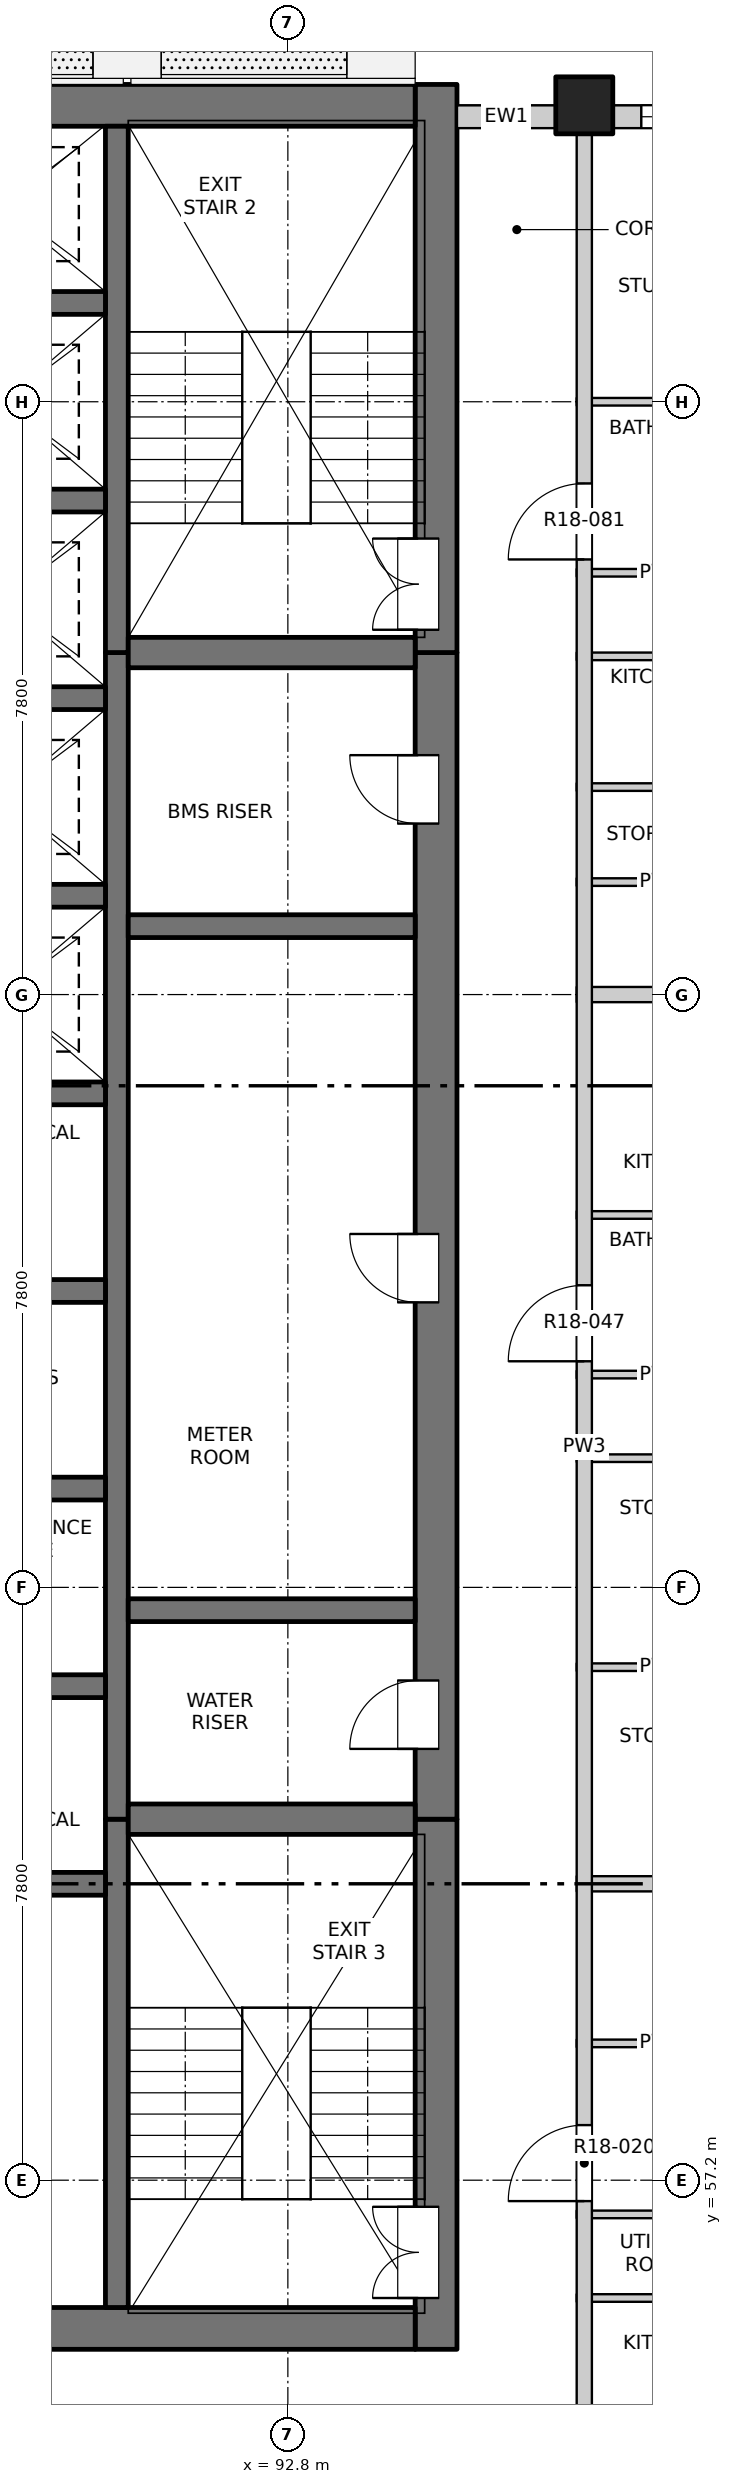
"""IFC4 building model, lengths in metres.
Left out: names, types, materials, properties, quantities, classifications, styles, units other than length and angle.
Written with IfcOpenShell. Run it as: python <this file> out.ifc"""

import sys

from ifc_helpers import new_model, si_unit, direction, frame, frame_2d, origin, origin_2d, place, context, subcontext, project, spatial, rectangle, extrude, element, fill, save


model = new_model("IFC4")
c1 = context("Model", 3, precision=1e-05, world=origin(), true_north=direction((0.0, 1.0)))
c2 = subcontext(c1, "Body", "Model", "MODEL_VIEW")
j1 = project(units=[si_unit("LENGTHUNIT", "METRE"), si_unit("PLANEANGLEUNIT", "RADIAN")], contexts=[c1])
p1 = place(None, origin())
s1 = spatial("IfcSite", under=j1, at=p1, CompositionType="ELEMENT")
p2 = place(p1, origin())
s2 = spatial("IfcBuilding", under=s1, at=p2, CompositionType="ELEMENT")
p3 = place(p2, frame((0.0, 0.0, 189.4)))
s3 = spatial("IfcBuildingStorey", under=s2, at=p3, CompositionType="ELEMENT", Elevation=189.4)
p4 = place(p3, frame((96.7, 84.5, -0.25), z_axis=(0.0, 0.0, 1.0), x_axis=(1.0, 0.0, 0.0)))
e1 = element("IfcColumn", 1, at=p4, inside=s3, PredefinedType="COLUMN", context=c2, shape_type="SweptSolid", body=[
    extrude(rectangle(XDim=0.75, YDim=0.75, at=origin_2d()), origin(), (0.0, 0.0, 1.0), 3.35),
])
p5 = place(p3, frame((94.75, 54.975, -0.25), z_axis=(0.0, 0.0, 1.0), x_axis=(0.0, 1.0, 0.0)))
e2 = element("IfcWall", 2, at=p5, inside=s3, PredefinedType="SOLIDWALL", context=c2, shape_type="SweptSolid", body=[
    extrude(rectangle(XDim=6.975, YDim=0.55, at=frame_2d((3.487, 0.0))), origin(), (0.0, 0.0, 1.0), 3.35),
])
p6 = place(p5, frame((0.675, 0.0, 0.25)))
e3 = element("IfcOpeningElement", 3, at=p6, cuts=e2, PredefinedType="OPENING", context=c2, shape_type="SweptSolid", body=[
    extrude(rectangle(XDim=1.2, YDim=2.1, at=frame_2d((0.6, 1.05))), frame((0.0, 0.285, 0.0), z_axis=(0.0, -1.0, 0.0), x_axis=(1.0, 0.0, 0.0)), (0.0, 0.0, 1.0), 0.57),
])
p7 = place(p3, frame((94.75, 61.95, -0.25), z_axis=(0.0, 0.0, 1.0), x_axis=(0.0, 1.0, 0.0)))
e4 = element("IfcWall", 4, at=p7, inside=s3, PredefinedType="SOLIDWALL", context=c2, shape_type="SweptSolid", body=[
    extrude(rectangle(XDim=15.35, YDim=0.55, at=frame_2d((7.675, 0.0))), origin(), (0.0, 0.0, 1.0), 3.35),
])
p8 = place(p7, frame((0.925, 0.0, 0.25)))
e5 = element("IfcOpeningElement", 5, at=p8, cuts=e4, PredefinedType="OPENING", context=c2, shape_type="SweptSolid", body=[
    extrude(rectangle(XDim=0.9, YDim=2.1, at=frame_2d((0.45, 1.05))), frame((0.0, 0.285, 0.0), z_axis=(0.0, -1.0, 0.0), x_axis=(1.0, 0.0, 0.0)), (0.0, 0.0, 1.0), 0.57),
])
p9 = place(p7, frame((6.8, 0.0, 0.25)))
e6 = element("IfcOpeningElement", 6, at=p9, cuts=e4, PredefinedType="OPENING", context=c2, shape_type="SweptSolid", body=[
    extrude(rectangle(XDim=0.9, YDim=2.1, at=frame_2d((0.45, 1.05))), frame((0.0, 0.285, 0.0), z_axis=(0.0, -1.0, 0.0), x_axis=(1.0, 0.0, 0.0)), (0.0, 0.0, 1.0), 0.57),
])
p10 = place(p7, frame((13.1, 0.0, 0.25)))
e7 = element("IfcOpeningElement", 7, at=p10, cuts=e4, PredefinedType="OPENING", context=c2, shape_type="SweptSolid", body=[
    extrude(rectangle(XDim=0.9, YDim=2.1, at=frame_2d((0.45, 1.05))), frame((0.0, 0.285, 0.0), z_axis=(0.0, -1.0, 0.0), x_axis=(1.0, 0.0, 0.0)), (0.0, 0.0, 1.0), 0.57),
])
p11 = place(p3, frame((94.75, 77.3, -0.25), z_axis=(0.0, 0.0, 1.0), x_axis=(0.0, 1.0, 0.0)))
e8 = element("IfcWall", 8, at=p11, inside=s3, PredefinedType="SOLIDWALL", context=c2, shape_type="SweptSolid", body=[
    extrude(rectangle(XDim=7.475, YDim=0.55, at=frame_2d((3.737, 0.0))), origin(), (0.0, 0.0, 1.0), 3.35),
])
p12 = place(p11, frame((0.3, 0.0, 0.25)))
e9 = element("IfcOpeningElement", 9, at=p12, cuts=e8, PredefinedType="OPENING", context=c2, shape_type="SweptSolid", body=[
    extrude(rectangle(XDim=1.2, YDim=2.1, at=frame_2d((0.6, 1.05))), frame((0.0, 0.285, 0.0), z_axis=(0.0, -1.0, 0.0), x_axis=(1.0, 0.0, 0.0)), (0.0, 0.0, 1.0), 0.57),
])
p13 = place(p3, frame((75.525, 55.25, -0.25), z_axis=(0.0, 0.0, 1.0), x_axis=(1.0, 0.0, 0.0)))
e10 = element("IfcWall", 10, at=p13, inside=s3, PredefinedType="SOLIDWALL", context=c2, shape_type="SweptSolid", body=[
    extrude(rectangle(XDim=18.95, YDim=0.55, at=frame_2d((9.475, 0.0))), origin(), (0.0, 0.0, 1.0), 3.35),
])
p14 = place(p13, frame((8.725, 0.0, 0.25)))
e11 = element("IfcOpeningElement", 11, at=p14, cuts=e10, PredefinedType="OPENING", context=c2, shape_type="SweptSolid", body=[
    extrude(rectangle(XDim=1.5, YDim=2.1, at=frame_2d((0.75, 1.05))), frame((0.0, 0.285, 0.0), z_axis=(0.0, -1.0, 0.0), x_axis=(1.0, 0.0, 0.0)), (0.0, 0.0, 1.0), 0.57),
])
p15 = place(p3, frame((75.525, 84.5, -0.25), z_axis=(0.0, 0.0, 1.0), x_axis=(1.0, 0.0, 0.0)))
e12 = element("IfcWall", 12, at=p15, inside=s3, PredefinedType="SOLIDWALL", context=c2, shape_type="SweptSolid", body=[
    extrude(rectangle(XDim=18.95, YDim=0.55, at=frame_2d((9.475, 0.0))), origin(), (0.0, 0.0, 1.0), 3.35),
])
p16 = place(p3, frame((90.55, 55.525, -0.25), z_axis=(0.0, 0.0, 1.0), x_axis=(0.0, 1.0, 0.0)))
e13 = element("IfcWall", 13, at=p16, inside=s3, PredefinedType="SOLIDWALL", context=c2, shape_type="SweptSolid", body=[
    extrude(rectangle(XDim=6.425, YDim=0.3, at=frame_2d((3.212, 0.0))), origin(), (0.0, 0.0, 1.0), 3.35),
])
p17 = place(p3, frame((90.55, 61.95, -0.25), z_axis=(0.0, 0.0, 1.0), x_axis=(0.0, 1.0, 0.0)))
e14 = element("IfcWall", 14, at=p17, inside=s3, PredefinedType="SOLIDWALL", context=c2, shape_type="SweptSolid", body=[
    extrude(rectangle(XDim=15.35, YDim=0.3, at=frame_2d((7.675, 0.0))), origin(), (0.0, 0.0, 1.0), 3.35),
])
p18 = place(p3, frame((90.55, 77.3, -0.25), z_axis=(0.0, 0.0, 1.0), x_axis=(0.0, 1.0, 0.0)))
e15 = element("IfcWall", 15, at=p18, inside=s3, PredefinedType="SOLIDWALL", context=c2, shape_type="SweptSolid", body=[
    extrude(rectangle(XDim=6.925, YDim=0.3, at=frame_2d((3.462, 0.0))), origin(), (0.0, 0.0, 1.0), 3.35),
])
for number, where, z_axis, x_axis in (
    (16, (87.4, 61.1, -0.25), (0.0, 0.0, 1.0), (1.0, 0.0, 0.0)),
    (17, (87.4, 63.7, -0.25), (0.0, 0.0, 1.0), (1.0, 0.0, 0.0)),
    (18, (87.4, 66.3, -0.25), (0.0, 0.0, 1.0), (1.0, 0.0, 0.0)),
    (19, (87.4, 68.9, -0.25), (0.0, 0.0, 1.0), (1.0, 0.0, 0.0)),
    (20, (87.4, 71.5, -0.25), (0.0, 0.0, 1.0), (1.0, 0.0, 0.0)),
    (21, (87.4, 74.1, -0.25), (0.0, 0.0, 1.0), (1.0, 0.0, 0.0)),
    (22, (87.4, 76.7, -0.25), (0.0, 0.0, 1.0), (1.0, 0.0, 0.0)),
    (23, (87.4, 79.3, -0.25), (0.0, 0.0, 1.0), (1.0, 0.0, 0.0)),
    (24, (87.4, 81.9, -0.25), (0.0, 0.0, 1.0), (1.0, 0.0, 0.0)),
):
    element("IfcWall", number, at=place(p3, frame(where, z_axis=z_axis, x_axis=x_axis)), inside=s3, PredefinedType="SOLIDWALL", context=c2, shape_type="SweptSolid", body=[
        extrude(rectangle(XDim=3.0, YDim=0.3, at=frame_2d((1.5, 0.0))), origin(), (0.0, 0.0, 1.0), 3.35),
    ])
p19 = place(p3, frame((90.7, 61.95, -0.25), z_axis=(0.0, 0.0, 1.0), x_axis=(1.0, 0.0, 0.0)))
e25 = element("IfcWall", 25, at=p19, inside=s3, PredefinedType="SOLIDWALL", context=c2, shape_type="SweptSolid", body=[
    extrude(rectangle(XDim=3.775, YDim=0.4, at=frame_2d((1.888, 0.0))), origin(), (0.0, 0.0, 1.0), 3.35),
])
for number, where, z_axis, x_axis in (
    (26, (90.7, 64.7, -0.25), (0.0, 0.0, 1.0), (1.0, 0.0, 0.0)),
    (27, (90.7, 73.7, -0.25), (0.0, 0.0, 1.0), (1.0, 0.0, 0.0)),
):
    element("IfcWall", number, at=place(p3, frame(where, z_axis=z_axis, x_axis=x_axis)), inside=s3, PredefinedType="SOLIDWALL", context=c2, shape_type="SweptSolid", body=[
        extrude(rectangle(XDim=3.775, YDim=0.3, at=frame_2d((1.888, 0.0))), origin(), (0.0, 0.0, 1.0), 3.35),
    ])
p20 = place(p3, frame((90.7, 77.3, -0.25), z_axis=(0.0, 0.0, 1.0), x_axis=(1.0, 0.0, 0.0)))
e28 = element("IfcWall", 28, at=p20, inside=s3, PredefinedType="SOLIDWALL", context=c2, shape_type="SweptSolid", body=[
    extrude(rectangle(XDim=3.775, YDim=0.4, at=frame_2d((1.888, 0.0))), origin(), (0.0, 0.0, 1.0), 3.35),
])
p21 = place(p3, frame((95.025, 84.35, 0.0), z_axis=(0.0, 0.0, 1.0), x_axis=(1.0, 0.0, 0.0)))
e29 = element("IfcWall", 29, at=p21, inside=s3, PredefinedType="SOLIDWALL", context=c2, shape_type="SweptSolid", body=[
    extrude(rectangle(XDim=1.3, YDim=0.3, at=frame_2d((0.65, 0.0))), origin(), (0.0, 0.0, 1.0), 3.1),
])
p22 = place(p3, frame((97.075, 84.35, 0.0), z_axis=(0.0, 0.0, 1.0), x_axis=(1.0, 0.0, 0.0)))
e30 = element("IfcWall", 30, at=p22, inside=s3, PredefinedType="SOLIDWALL", context=c2, shape_type="SweptSolid", body=[
    extrude(rectangle(XDim=3.525, YDim=0.3, at=frame_2d((1.763, 0.0))), origin(), (0.0, 0.0, 1.0), 3.1),
])
p23 = place(p22, frame((0.375, 0.0, 0.9)))
e31 = element("IfcOpeningElement", 31, at=p23, cuts=e30, PredefinedType="OPENING", context=c2, shape_type="SweptSolid", body=[
    extrude(rectangle(XDim=2.4, YDim=1.8, at=frame_2d((1.2, 0.9))), frame((0.0, 0.16, 0.0), z_axis=(0.0, -1.0, 0.0), x_axis=(1.0, 0.0, 0.0)), (0.0, 0.0, 1.0), 0.32),
])
for number, where, z_axis, x_axis in (
    (32, (96.6, 55.65, 0.0), (0.0, 0.0, 1.0), (1.0, 0.0, 0.0)),
    (33, (96.6, 56.75, 0.0), (0.0, 0.0, 1.0), (1.0, 0.0, 0.0)),
    (34, (96.6, 59.0, 0.0), (0.0, 0.0, 1.0), (1.0, 0.0, 0.0)),
):
    element("IfcWall", number, at=place(p3, frame(where, z_axis=z_axis, x_axis=x_axis)), inside=s3, PredefinedType="PARTITIONING", context=c2, shape_type="SweptSolid", body=[
        extrude(rectangle(XDim=2.22, YDim=0.1, at=frame_2d((1.11, 0.0))), origin(), (0.0, 0.0, 1.0), 3.1),
    ])
p24 = place(p3, frame((96.6, 61.1, 0.0), z_axis=(0.0, 0.0, 1.0), x_axis=(1.0, 0.0, 0.0)))
e35 = element("IfcWall", 35, at=p24, inside=s3, PredefinedType="PARTITIONING", context=c2, shape_type="SweptSolid", body=[
    extrude(rectangle(XDim=7.6, YDim=0.2, at=frame_2d((3.8, 0.0))), origin(), (0.0, 0.0, 1.0), 3.1),
])
for number, where, z_axis, x_axis in (
    (36, (96.6, 63.95, 0.0), (0.0, 0.0, 1.0), (1.0, 0.0, 0.0)),
    (37, (96.6, 66.7, 0.0), (0.0, 0.0, 1.0), (1.0, 0.0, 0.0)),
    (38, (96.6, 67.8, 0.0), (0.0, 0.0, 1.0), (1.0, 0.0, 0.0)),
    (39, (96.6, 69.9, 0.0), (0.0, 0.0, 1.0), (1.0, 0.0, 0.0)),
):
    element("IfcWall", number, at=place(p3, frame(where, z_axis=z_axis, x_axis=x_axis)), inside=s3, PredefinedType="PARTITIONING", context=c2, shape_type="SweptSolid", body=[
        extrude(rectangle(XDim=2.22, YDim=0.1, at=frame_2d((1.11, 0.0))), origin(), (0.0, 0.0, 1.0), 3.1),
    ])
p25 = place(p3, frame((96.6, 72.8, 0.0), z_axis=(0.0, 0.0, 1.0), x_axis=(1.0, 0.0, 0.0)))
e40 = element("IfcWall", 40, at=p25, inside=s3, PredefinedType="PARTITIONING", context=c2, shape_type="SweptSolid", body=[
    extrude(rectangle(XDim=7.6, YDim=0.2, at=frame_2d((3.8, 0.0))), origin(), (0.0, 0.0, 1.0), 3.1),
])
for number, where, z_axis, x_axis in (
    (41, (96.6, 74.28, 0.0), (0.0, 0.0, 1.0), (1.0, 0.0, 0.0)),
    (42, (96.6, 75.53, 0.0), (0.0, 0.0, 1.0), (1.0, 0.0, 0.0)),
    (43, (96.6, 77.25, 0.0), (0.0, 0.0, 1.0), (1.0, 0.0, 0.0)),
    (44, (96.6, 78.35, 0.0), (0.0, 0.0, 1.0), (1.0, 0.0, 0.0)),
):
    element("IfcWall", number, at=place(p3, frame(where, z_axis=z_axis, x_axis=x_axis)), inside=s3, PredefinedType="PARTITIONING", context=c2, shape_type="SweptSolid", body=[
        extrude(rectangle(XDim=2.22, YDim=0.1, at=frame_2d((1.11, 0.0))), origin(), (0.0, 0.0, 1.0), 3.1),
    ])
p26 = place(p3, frame((96.6, 80.6, 0.0), z_axis=(0.0, 0.0, 1.0), x_axis=(1.0, 0.0, 0.0)))
e45 = element("IfcWall", 45, at=p26, inside=s3, PredefinedType="PARTITIONING", context=c2, shape_type="SweptSolid", body=[
    extrude(rectangle(XDim=7.6, YDim=0.1, at=frame_2d((3.8, 0.0))), origin(), (0.0, 0.0, 1.0), 3.1),
])
p27 = place(p26, frame((2.56, 0.0, 0.0)))
e46 = element("IfcOpeningElement", 46, at=p27, cuts=e45, PredefinedType="OPENING", context=c2, shape_type="SweptSolid", body=[
    extrude(rectangle(XDim=0.9, YDim=2.1, at=frame_2d((0.45, 1.05))), frame((0.0, 0.06, 0.0), z_axis=(0.0, -1.0, 0.0), x_axis=(1.0, 0.0, 0.0)), (0.0, 0.0, 1.0), 0.12),
])
p28 = place(p3, frame((96.7, 49.5, 0.0), z_axis=(0.0, 0.0, 1.0), x_axis=(0.0, 1.0, 0.0)))
e47 = element("IfcWall", 47, at=p28, inside=s3, PredefinedType="PARTITIONING", context=c2, shape_type="SweptSolid", body=[
    extrude(rectangle(XDim=34.7, YDim=0.2, at=frame_2d((17.35, 0.0))), origin(), (0.0, 0.0, 1.0), 3.1),
])
p29 = place(p28, frame((7.425, 0.0, 0.0)))
e48 = element("IfcOpeningElement", 48, at=p29, cuts=e47, PredefinedType="OPENING", context=c2, shape_type="SweptSolid", body=[
    extrude(rectangle(XDim=1.0, YDim=2.1, at=frame_2d((0.5, 1.05))), frame((0.0, 0.11, 0.0), z_axis=(0.0, -1.0, 0.0), x_axis=(1.0, 0.0, 0.0)), (0.0, 0.0, 1.0), 0.22),
])
p30 = place(p28, frame((18.475, 0.0, 0.0)))
e49 = element("IfcOpeningElement", 49, at=p30, cuts=e47, PredefinedType="OPENING", context=c2, shape_type="SweptSolid", body=[
    extrude(rectangle(XDim=1.0, YDim=2.1, at=frame_2d((0.5, 1.05))), frame((0.0, 0.11, 0.0), z_axis=(0.0, -1.0, 0.0), x_axis=(1.0, 0.0, 0.0)), (0.0, 0.0, 1.0), 0.22),
])
p31 = place(p28, frame((29.025, 0.0, 0.0)))
e50 = element("IfcOpeningElement", 50, at=p31, cuts=e47, PredefinedType="OPENING", context=c2, shape_type="SweptSolid", body=[
    extrude(rectangle(XDim=1.0, YDim=2.1, at=frame_2d((0.5, 1.05))), frame((0.0, 0.11, 0.0), z_axis=(0.0, -1.0, 0.0), x_axis=(1.0, 0.0, 0.0)), (0.0, 0.0, 1.0), 0.22),
])
p32 = place(p23, origin())
e51 = element("IfcWindow", 51, at=p32, inside=s3, PartitioningType="DOUBLE_PANEL_VERTICAL", PredefinedType="WINDOW", context=c2, shape_type="SweptSolid", body=[
    extrude(rectangle(XDim=2.4, YDim=1.8, at=frame_2d((1.2, 0.9))), frame((0.0, 0.03, 0.0), z_axis=(0.0, -1.0, 0.0), x_axis=(1.0, 0.0, 0.0)), (0.0, 0.0, 1.0), 0.06),
])
fill(e31, e51)
p33 = place(p6, origin())
e52 = element("IfcDoor", 52, at=p33, inside=s3, OperationType="DOUBLE_DOOR_SINGLE_SWING", PredefinedType="DOOR", context=c2, shape_type="SweptSolid", body=[
    extrude(rectangle(XDim=1.2, YDim=2.1, at=frame_2d((0.6, 1.05))), frame((0.0, 0.26, 0.0), z_axis=(0.0, -1.0, 0.0), x_axis=(1.0, 0.0, 0.0)), (0.0, 0.0, 1.0), 0.05),
])
fill(e3, e52)
p34 = place(p29, origin())
e53 = element("IfcDoor", 53, at=p34, inside=s3, OperationType="SINGLE_SWING_LEFT", PredefinedType="DOOR", context=c2, shape_type="SweptSolid", body=[
    extrude(rectangle(XDim=1.0, YDim=2.1, at=frame_2d((0.5, 1.05))), frame((0.0, 0.025, 0.0), z_axis=(0.0, -1.0, 0.0), x_axis=(1.0, 0.0, 0.0)), (0.0, 0.0, 1.0), 0.05),
])
fill(e48, e53)
p35 = place(p8, origin())
e54 = element("IfcDoor", 54, at=p35, inside=s3, OperationType="SINGLE_SWING_LEFT", PredefinedType="DOOR", context=c2, shape_type="SweptSolid", body=[
    extrude(rectangle(XDim=0.9, YDim=2.1, at=frame_2d((0.45, 1.05))), frame((0.0, 0.26, 0.0), z_axis=(0.0, -1.0, 0.0), x_axis=(1.0, 0.0, 0.0)), (0.0, 0.0, 1.0), 0.05),
])
fill(e5, e54)
p36 = place(p30, origin())
e55 = element("IfcDoor", 55, at=p36, inside=s3, OperationType="SINGLE_SWING_LEFT", PredefinedType="DOOR", context=c2, shape_type="SweptSolid", body=[
    extrude(rectangle(XDim=1.0, YDim=2.1, at=frame_2d((0.5, 1.05))), frame((0.0, 0.025, 0.0), z_axis=(0.0, -1.0, 0.0), x_axis=(1.0, 0.0, 0.0)), (0.0, 0.0, 1.0), 0.05),
])
fill(e49, e55)
p37 = place(p9, origin())
e56 = element("IfcDoor", 56, at=p37, inside=s3, OperationType="SINGLE_SWING_RIGHT", PredefinedType="DOOR", context=c2, shape_type="SweptSolid", body=[
    extrude(rectangle(XDim=0.9, YDim=2.1, at=frame_2d((0.45, 1.05))), frame((0.0, 0.26, 0.0), z_axis=(0.0, -1.0, 0.0), x_axis=(1.0, 0.0, 0.0)), (0.0, 0.0, 1.0), 0.05),
])
fill(e6, e56)
p38 = place(p10, origin())
e57 = element("IfcDoor", 57, at=p38, inside=s3, OperationType="SINGLE_SWING_RIGHT", PredefinedType="DOOR", context=c2, shape_type="SweptSolid", body=[
    extrude(rectangle(XDim=0.9, YDim=2.1, at=frame_2d((0.45, 1.05))), frame((0.0, 0.26, 0.0), z_axis=(0.0, -1.0, 0.0), x_axis=(1.0, 0.0, 0.0)), (0.0, 0.0, 1.0), 0.05),
])
fill(e7, e57)
p39 = place(p12, origin())
e58 = element("IfcDoor", 58, at=p39, inside=s3, OperationType="DOUBLE_DOOR_SINGLE_SWING", PredefinedType="DOOR", context=c2, shape_type="SweptSolid", body=[
    extrude(rectangle(XDim=1.2, YDim=2.1, at=frame_2d((0.6, 1.05))), frame((0.0, 0.26, 0.0), z_axis=(0.0, -1.0, 0.0), x_axis=(1.0, 0.0, 0.0)), (0.0, 0.0, 1.0), 0.05),
])
fill(e9, e58)
p40 = place(p31, origin())
e59 = element("IfcDoor", 59, at=p40, inside=s3, OperationType="SINGLE_SWING_LEFT", PredefinedType="DOOR", context=c2, shape_type="SweptSolid", body=[
    extrude(rectangle(XDim=1.0, YDim=2.1, at=frame_2d((0.5, 1.05))), frame((0.0, 0.025, 0.0), z_axis=(0.0, -1.0, 0.0), x_axis=(1.0, 0.0, 0.0)), (0.0, 0.0, 1.0), 0.05),
])
fill(e50, e59)
save(model, sys.argv[1])
